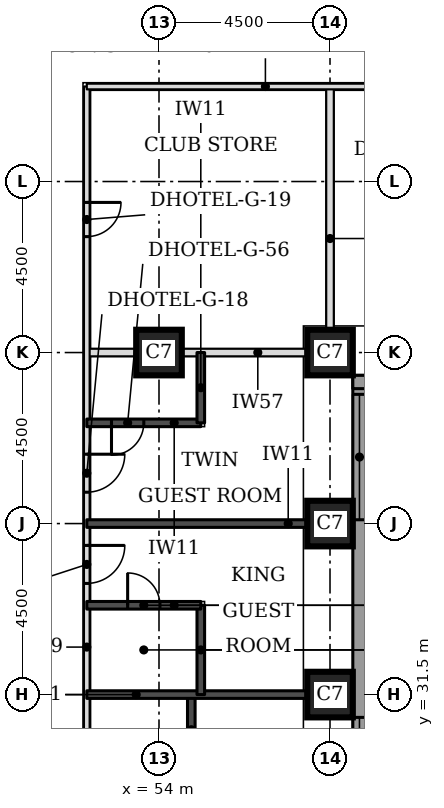
"""IFC4 building model, lengths in metres.
Left out: names, types, materials, properties, quantities, classifications, styles, units other than length and angle.
Written with IfcOpenShell. Run it as: python <this file> out.ifc"""

import sys

from ifc_helpers import new_model, si_unit, direction, frame, frame_2d, origin, origin_2d, place, context, subcontext, project, spatial, rectangle, extrude, element, fill, save


model = new_model("IFC4")
c1 = context("Model", 3, precision=1e-05, world=origin(), true_north=direction((0.0, 1.0)))
c2 = subcontext(c1, "Body", "Model", "MODEL_VIEW")
j1 = project(units=[si_unit("LENGTHUNIT", "METRE"), si_unit("PLANEANGLEUNIT", "RADIAN")], contexts=[c1])
p1 = place(None, origin())
s1 = spatial("IfcSite", under=j1, at=p1, CompositionType="ELEMENT")
p2 = place(p1, origin())
s2 = spatial("IfcBuilding", under=s1, at=p2, CompositionType="ELEMENT")
p3 = place(p2, frame((0.0, 0.0, 66.0)))
s3 = spatial("IfcBuildingStorey", under=s2, at=p3, CompositionType="ELEMENT", Elevation=66.0)
for number, where, z_axis, x_axis in (
    (1, (58.5, 31.5, 0.0), (0.0, 0.0, 1.0), (1.0, 0.0, 0.0)),
    (2, (58.5, 36.0, 0.0), (0.0, 0.0, 1.0), (1.0, 0.0, 0.0)),
    (3, (54.0, 40.5, 0.0), (0.0, 0.0, 1.0), (1.0, 0.0, 0.0)),
    (4, (58.5, 40.5, 0.0), (0.0, 0.0, 1.0), (1.0, 0.0, 0.0)),
):
    element("IfcColumn", number, at=place(p3, frame(where, z_axis=z_axis, x_axis=x_axis)), inside=s3, PredefinedType="COLUMN", context=c2, shape_type="SweptSolid", body=[
        extrude(rectangle(XDim=1.2, YDim=1.2, at=origin_2d()), origin(), (0.0, 0.0, 1.0), 3.3),
    ])
p4 = place(p3, frame((59.275, 22.106, 0.0), z_axis=(0.0, 0.0, 1.0), x_axis=(0.0, 1.0, 0.0)))
e5 = element("IfcWall", 5, at=p4, inside=s3, PredefinedType="STANDARD", context=c2, shape_type="SweptSolid", body=[
    extrude(rectangle(XDim=17.793, YDim=0.35, at=frame_2d((8.897, 0.0))), origin(), (0.0, 0.0, 1.0), 3.055),
])
p5 = place(p4, frame((5.493, 0.0, 0.8)))
e6 = element("IfcOpeningElement", 6, at=p5, cuts=e5, PredefinedType="OPENING", context=c2, shape_type="SweptSolid", body=[
    extrude(rectangle(XDim=3.3, YDim=1.5, at=frame_2d((1.65, 0.75))), frame((0.0, 0.185, 0.0), z_axis=(0.0, -1.0, 0.0), x_axis=(1.0, 0.0, 0.0)), (0.0, 0.0, 1.0), 0.37),
])
p6 = place(p4, frame((13.993, 0.0, 0.8)))
e7 = element("IfcOpeningElement", 7, at=p6, cuts=e5, PredefinedType="OPENING", context=c2, shape_type="SweptSolid", body=[
    extrude(rectangle(XDim=3.3, YDim=1.5, at=frame_2d((1.65, 0.75))), frame((0.0, 0.185, 0.0), z_axis=(0.0, -1.0, 0.0), x_axis=(1.0, 0.0, 0.0)), (0.0, 0.0, 1.0), 0.37),
])
p7 = place(p3, frame((59.1, 39.725, 0.0), z_axis=(0.0, 0.0, 1.0), x_axis=(1.0, 0.0, 0.0)))
e8 = element("IfcWall", 8, at=p7, inside=s3, PredefinedType="STANDARD", context=c2, shape_type="SweptSolid", body=[
    extrude(rectangle(XDim=13.293, YDim=0.35, at=frame_2d((6.647, 0.0))), origin(), (0.0, 0.0, 1.0), 3.055),
])
p8 = place(p7, frame((0.5, 0.0, 0.8)))
e9 = element("IfcOpeningElement", 9, at=p8, cuts=e8, PredefinedType="OPENING", context=c2, shape_type="SweptSolid", body=[
    extrude(rectangle(XDim=3.3, YDim=1.5, at=frame_2d((1.65, 0.75))), frame((0.0, 0.185, 0.0), z_axis=(0.0, -1.0, 0.0), x_axis=(1.0, 0.0, 0.0)), (0.0, 0.0, 1.0), 0.37),
])
p9 = place(p3, frame((52.1, 40.5, 0.0), z_axis=(0.0, 0.0, 1.0), x_axis=(1.0, 0.0, 0.0)))
e10 = element("IfcWall", 10, at=p9, inside=s3, PredefinedType="PARTITIONING", context=c2, shape_type="SweptSolid", body=[
    extrude(rectangle(XDim=5.8, YDim=0.2, at=frame_2d((2.9, 0.0))), origin(), (0.0, 0.0, 1.0), 2.33),
])
p10 = place(p3, frame((58.5, 41.1, 0.0), z_axis=(0.0, 0.0, 1.0), x_axis=(0.0, 1.0, 0.0)))
e11 = element("IfcWall", 11, at=p10, inside=s3, PredefinedType="PARTITIONING", context=c2, shape_type="SweptSolid", body=[
    extrude(rectangle(XDim=6.4, YDim=0.2, at=frame_2d((3.2, 0.0))), origin(), (0.0, 0.0, 1.0), 3.08),
])
p11 = place(p3, frame((52.1, 24.4, 0.0), z_axis=(0.0, 0.0, 1.0), x_axis=(0.0, 1.0, 0.0)))
e12 = element("IfcWall", 12, at=p11, inside=s3, PredefinedType="PARTITIONING", context=c2, shape_type="SweptSolid", body=[
    extrude(rectangle(XDim=23.1, YDim=0.15, at=frame_2d((11.55, 0.0))), origin(), (0.0, 0.0, 1.0), 3.08),
])
p12 = place(p11, frame((1.025, 0.0, 0.0)))
e13 = element("IfcOpeningElement", 13, at=p12, cuts=e12, PredefinedType="OPENING", context=c2, shape_type="SweptSolid", body=[
    extrude(rectangle(XDim=1.0, YDim=2.1, at=frame_2d((0.5, 1.05))), frame((0.0, 0.085, 0.0), z_axis=(0.0, -1.0, 0.0), x_axis=(1.0, 0.0, 0.0)), (0.0, 0.0, 1.0), 0.17),
])
p13 = place(p11, frame((3.425, 0.0, 0.0)))
e14 = element("IfcOpeningElement", 14, at=p13, cuts=e12, PredefinedType="OPENING", context=c2, shape_type="SweptSolid", body=[
    extrude(rectangle(XDim=1.0, YDim=2.1, at=frame_2d((0.5, 1.05))), frame((0.0, 0.085, 0.0), z_axis=(0.0, -1.0, 0.0), x_axis=(1.0, 0.0, 0.0)), (0.0, 0.0, 1.0), 0.17),
])
p14 = place(p11, frame((10.025, 0.0, 0.0)))
e15 = element("IfcOpeningElement", 15, at=p14, cuts=e12, PredefinedType="OPENING", context=c2, shape_type="SweptSolid", body=[
    extrude(rectangle(XDim=1.0, YDim=2.1, at=frame_2d((0.5, 1.05))), frame((0.0, 0.085, 0.0), z_axis=(0.0, -1.0, 0.0), x_axis=(1.0, 0.0, 0.0)), (0.0, 0.0, 1.0), 0.17),
])
p15 = place(p11, frame((12.425, 0.0, 0.0)))
e16 = element("IfcOpeningElement", 16, at=p15, cuts=e12, PredefinedType="OPENING", context=c2, shape_type="SweptSolid", body=[
    extrude(rectangle(XDim=1.0, YDim=2.1, at=frame_2d((0.5, 1.05))), frame((0.0, 0.085, 0.0), z_axis=(0.0, -1.0, 0.0), x_axis=(1.0, 0.0, 0.0)), (0.0, 0.0, 1.0), 0.17),
])
p16 = place(p11, frame((19.15, 0.0, 0.0)))
e17 = element("IfcOpeningElement", 17, at=p16, cuts=e12, PredefinedType="OPENING", context=c2, shape_type="SweptSolid", body=[
    extrude(rectangle(XDim=0.9, YDim=2.1, at=frame_2d((0.45, 1.05))), frame((0.0, 0.085, 0.0), z_axis=(0.0, -1.0, 0.0), x_axis=(1.0, 0.0, 0.0)), (0.0, 0.0, 1.0), 0.17),
])
p17 = place(p3, frame((52.1, 47.5, 0.0), z_axis=(0.0, 0.0, 1.0), x_axis=(1.0, 0.0, 0.0)))
e18 = element("IfcWall", 18, at=p17, inside=s3, PredefinedType="PARTITIONING", context=c2, shape_type="SweptSolid", body=[
    extrude(rectangle(XDim=17.4, YDim=0.15, at=frame_2d((8.7, 0.0))), origin(), (0.0, 0.0, 1.0), 3.08),
])
p18 = place(p17, frame((8.65, 0.0, 0.0)))
e19 = element("IfcOpeningElement", 19, at=p18, cuts=e18, PredefinedType="OPENING", context=c2, shape_type="SweptSolid", body=[
    extrude(rectangle(XDim=1.1, YDim=2.1, at=frame_2d((0.55, 1.05))), frame((0.0, 0.085, 0.0), z_axis=(0.0, -1.0, 0.0), x_axis=(1.0, 0.0, 0.0)), (0.0, 0.0, 1.0), 0.17),
])
p19 = place(p17, frame((15.9, 0.0, 0.0)))
e20 = element("IfcOpeningElement", 20, at=p19, cuts=e18, PredefinedType="OPENING", context=c2, shape_type="SweptSolid", body=[
    extrude(rectangle(XDim=1.0, YDim=2.1, at=frame_2d((0.5, 1.05))), frame((0.0, 0.085, 0.0), z_axis=(0.0, -1.0, 0.0), x_axis=(1.0, 0.0, 0.0)), (0.0, 0.0, 1.0), 0.17),
])
p20 = place(p3, frame((54.85, 29.65, 0.0), z_axis=(0.0, 0.0, 1.0), x_axis=(0.0, 1.0, 0.0)))
e21 = element("IfcWall", 21, at=p20, inside=s3, PredefinedType="SOLIDWALL", context=c2, shape_type="SweptSolid", body=[
    extrude(rectangle(XDim=1.85, YDim=0.2, at=frame_2d((0.925, 0.0))), origin(), (0.0, 0.0, 1.0), 3.08),
])
p21 = place(p3, frame((52.1, 31.5, 0.0), z_axis=(0.0, 0.0, 1.0), x_axis=(1.0, 0.0, 0.0)))
e22 = element("IfcWall", 22, at=p21, inside=s3, PredefinedType="SOLIDWALL", context=c2, shape_type="SweptSolid", body=[
    extrude(rectangle(XDim=5.8, YDim=0.2, at=frame_2d((2.9, 0.0))), origin(), (0.0, 0.0, 1.0), 3.08),
])
p22 = place(p3, frame((55.1, 31.5, 0.0), z_axis=(0.0, 0.0, 1.0), x_axis=(0.0, 1.0, 0.0)))
e23 = element("IfcWall", 23, at=p22, inside=s3, PredefinedType="SOLIDWALL", context=c2, shape_type="SweptSolid", body=[
    extrude(rectangle(XDim=2.35, YDim=0.2, at=frame_2d((1.175, 0.0))), origin(), (0.0, 0.0, 1.0), 3.08),
])
p23 = place(p3, frame((52.1, 33.85, 0.0), z_axis=(0.0, 0.0, 1.0), x_axis=(1.0, 0.0, 0.0)))
e24 = element("IfcWall", 24, at=p23, inside=s3, PredefinedType="SOLIDWALL", context=c2, shape_type="SweptSolid", body=[
    extrude(rectangle(XDim=3.0, YDim=0.2, at=frame_2d((1.5, 0.0))), origin(), (0.0, 0.0, 1.0), 3.08),
])
p24 = place(p23, frame((1.075, 0.0, 0.0)))
e25 = element("IfcOpeningElement", 25, at=p24, cuts=e24, PredefinedType="OPENING", context=c2, shape_type="SweptSolid", body=[
    extrude(rectangle(XDim=0.85, YDim=2.1, at=frame_2d((0.425, 1.05))), frame((0.0, 0.11, 0.0), z_axis=(0.0, -1.0, 0.0), x_axis=(1.0, 0.0, 0.0)), (0.0, 0.0, 1.0), 0.22),
])
p25 = place(p3, frame((52.1, 36.0, 0.0), z_axis=(0.0, 0.0, 1.0), x_axis=(1.0, 0.0, 0.0)))
e26 = element("IfcWall", 26, at=p25, inside=s3, PredefinedType="SOLIDWALL", context=c2, shape_type="SweptSolid", body=[
    extrude(rectangle(XDim=5.8, YDim=0.2, at=frame_2d((2.9, 0.0))), origin(), (0.0, 0.0, 1.0), 3.08),
])
p26 = place(p3, frame((52.1, 38.65, 0.0), z_axis=(0.0, 0.0, 1.0), x_axis=(1.0, 0.0, 0.0)))
e27 = element("IfcWall", 27, at=p26, inside=s3, PredefinedType="SOLIDWALL", context=c2, shape_type="SweptSolid", body=[
    extrude(rectangle(XDim=3.0, YDim=0.2, at=frame_2d((1.5, 0.0))), origin(), (0.0, 0.0, 1.0), 3.08),
])
p27 = place(p26, frame((0.65, 0.0, 0.0)))
e28 = element("IfcOpeningElement", 28, at=p27, cuts=e27, PredefinedType="OPENING", context=c2, shape_type="SweptSolid", body=[
    extrude(rectangle(XDim=0.85, YDim=2.1, at=frame_2d((0.425, 1.05))), frame((0.0, 0.11, 0.0), z_axis=(0.0, -1.0, 0.0), x_axis=(1.0, 0.0, 0.0)), (0.0, 0.0, 1.0), 0.22),
])
p28 = place(p3, frame((55.1, 38.65, 0.0), z_axis=(0.0, 0.0, 1.0), x_axis=(0.0, 1.0, 0.0)))
e29 = element("IfcWall", 29, at=p28, inside=s3, PredefinedType="SOLIDWALL", context=c2, shape_type="SweptSolid", body=[
    extrude(rectangle(XDim=1.85, YDim=0.2, at=frame_2d((0.925, 0.0))), origin(), (0.0, 0.0, 1.0), 3.08),
])
p29 = place(p5, origin())
e30 = element("IfcWindow", 30, at=p29, inside=s3, PartitioningType="SINGLE_PANEL", PredefinedType="WINDOW", context=c2, shape_type="SweptSolid", body=[
    extrude(rectangle(XDim=3.3, YDim=1.5, at=frame_2d((1.65, 0.75))), frame((0.0, 0.085, 0.0), z_axis=(0.0, -1.0, 0.0), x_axis=(1.0, 0.0, 0.0)), (0.0, 0.0, 1.0), 0.06),
])
fill(e6, e30)
p30 = place(p6, origin())
e31 = element("IfcWindow", 31, at=p30, inside=s3, PartitioningType="SINGLE_PANEL", PredefinedType="WINDOW", context=c2, shape_type="SweptSolid", body=[
    extrude(rectangle(XDim=3.3, YDim=1.5, at=frame_2d((1.65, 0.75))), frame((0.0, 0.085, 0.0), z_axis=(0.0, -1.0, 0.0), x_axis=(1.0, 0.0, 0.0)), (0.0, 0.0, 1.0), 0.06),
])
fill(e7, e31)
p31 = place(p14, frame((1.0, 0.0, 0.0), z_axis=(0.0, 0.0, 1.0), x_axis=(-1.0, 0.0, 0.0)))
e32 = element("IfcDoor", 32, at=p31, inside=s3, OperationType="SINGLE_SWING_LEFT", PredefinedType="DOOR", context=c2, shape_type="SweptSolid", body=[
    extrude(rectangle(XDim=1.0, YDim=2.1, at=frame_2d((0.5, 1.05))), frame((0.0, 0.025, 0.0), z_axis=(0.0, -1.0, 0.0), x_axis=(1.0, 0.0, 0.0)), (0.0, 0.0, 1.0), 0.05),
])
fill(e15, e32)
p32 = place(p24, origin())
e33 = element("IfcDoor", 33, at=p32, inside=s3, OperationType="SINGLE_SWING_LEFT", PredefinedType="DOOR", context=c2, shape_type="SweptSolid", body=[
    extrude(rectangle(XDim=0.85, YDim=2.1, at=frame_2d((0.425, 1.05))), frame((0.0, 0.025, 0.0), z_axis=(0.0, -1.0, 0.0), x_axis=(1.0, 0.0, 0.0)), (0.0, 0.0, 1.0), 0.05),
])
fill(e25, e33)
p33 = place(p15, frame((1.0, 0.0, 0.0), z_axis=(0.0, 0.0, 1.0), x_axis=(-1.0, 0.0, 0.0)))
e34 = element("IfcDoor", 34, at=p33, inside=s3, OperationType="SINGLE_SWING_LEFT", PredefinedType="DOOR", context=c2, shape_type="SweptSolid", body=[
    extrude(rectangle(XDim=1.0, YDim=2.1, at=frame_2d((0.5, 1.05))), frame((0.0, 0.025, 0.0), z_axis=(0.0, -1.0, 0.0), x_axis=(1.0, 0.0, 0.0)), (0.0, 0.0, 1.0), 0.05),
])
fill(e16, e34)
p34 = place(p27, frame((0.85, 0.0, 0.0), z_axis=(0.0, 0.0, 1.0), x_axis=(-1.0, 0.0, 0.0)))
e35 = element("IfcDoor", 35, at=p34, inside=s3, OperationType="SINGLE_SWING_RIGHT", PredefinedType="DOOR", context=c2, shape_type="SweptSolid", body=[
    extrude(rectangle(XDim=0.85, YDim=2.1, at=frame_2d((0.425, 1.05))), frame((0.0, 0.025, 0.0), z_axis=(0.0, -1.0, 0.0), x_axis=(1.0, 0.0, 0.0)), (0.0, 0.0, 1.0), 0.05),
])
fill(e28, e35)
p35 = place(p16, frame((0.9, 0.0, 0.0), z_axis=(0.0, 0.0, 1.0), x_axis=(-1.0, 0.0, 0.0)))
e36 = element("IfcDoor", 36, at=p35, inside=s3, OperationType="SINGLE_SWING_LEFT", PredefinedType="DOOR", context=c2, shape_type="SweptSolid", body=[
    extrude(rectangle(XDim=0.9, YDim=2.1, at=frame_2d((0.45, 1.05))), frame((0.0, 0.025, 0.0), z_axis=(0.0, -1.0, 0.0), x_axis=(1.0, 0.0, 0.0)), (0.0, 0.0, 1.0), 0.05),
])
fill(e17, e36)
save(model, sys.argv[1])
